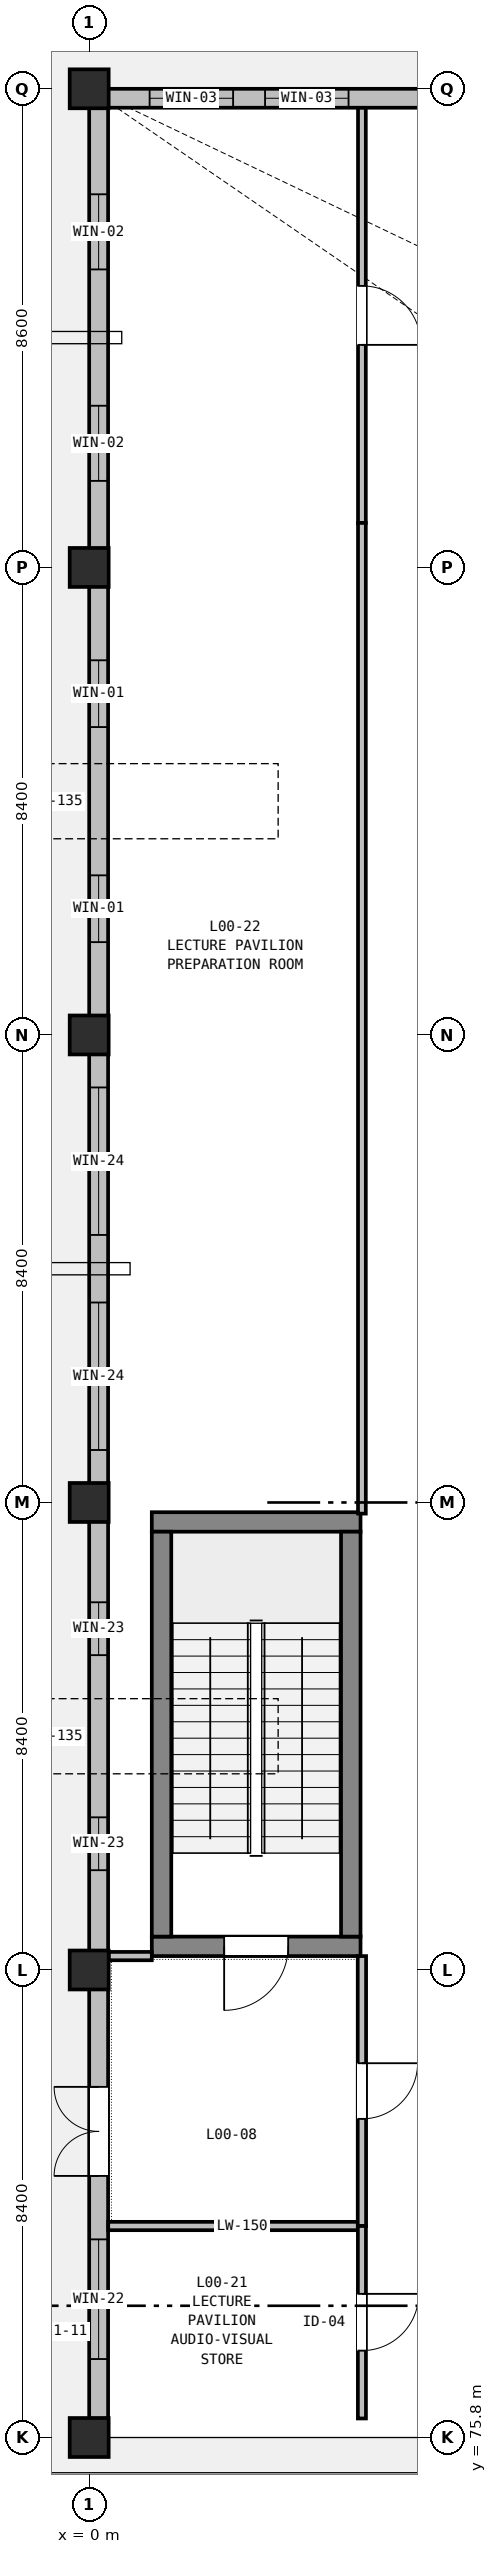
"""IFC4 building model, lengths in metres.
Left out: names, types, materials, properties, quantities, classifications, styles, units other than length and angle.
Written with IfcOpenShell. Run it as: python <this file> out.ifc"""

import sys

from ifc_helpers import new_model, si_unit, direction, frame, frame_2d, origin, origin_2d, place, context, subcontext, project, spatial, rectangle, extrude, element, fill, save


model = new_model("IFC4")
c1 = context("Model", 3, precision=1e-05, world=origin(), true_north=direction((0.0, 1.0)))
c2 = subcontext(c1, "Body", "Model", "MODEL_VIEW")
j1 = project(units=[si_unit("LENGTHUNIT", "METRE"), si_unit("PLANEANGLEUNIT", "RADIAN")], contexts=[c1])
p1 = place(None, origin())
s1 = spatial("IfcSite", under=j1, at=p1, CompositionType="ELEMENT")
p2 = place(p1, origin())
s2 = spatial("IfcBuilding", under=s1, at=p2, CompositionType="ELEMENT")
p3 = place(p2, origin())
s3 = spatial("IfcBuildingStorey", under=s2, at=p3, CompositionType="ELEMENT", Elevation=0.0)
for number, where, z_axis, x_axis in (
    (1, (0.0, 75.8, -0.32), (0.0, 0.0, 1.0), (1.0, 0.0, 0.0)),
    (2, (0.0, 84.2, -0.32), (0.0, 0.0, 1.0), (1.0, 0.0, 0.0)),
    (3, (0.0, 92.6, -0.32), (0.0, 0.0, 1.0), (1.0, 0.0, 0.0)),
    (4, (0.0, 101.0, -0.32), (0.0, 0.0, 1.0), (1.0, 0.0, 0.0)),
    (5, (0.0, 109.4, -0.32), (0.0, 0.0, 1.0), (1.0, 0.0, 0.0)),
    (6, (0.0, 118.0, -0.32), (0.0, 0.0, 1.0), (1.0, 0.0, 0.0)),
):
    element("IfcColumn", number, at=place(p3, frame(where, z_axis=z_axis, x_axis=x_axis)), inside=s3, PredefinedType="COLUMN", context=c2, shape_type="SweptSolid", body=[
        extrude(rectangle(XDim=0.7, YDim=0.7, at=origin_2d()), origin(), (0.0, 0.0, 1.0), 5.72),
    ])
p4 = place(p3, frame((4.875, 84.625, -0.32), z_axis=(0.0, 0.0, 1.0), x_axis=(-1.0, 0.0, 0.0)))
e7 = element("IfcWall", 7, at=p4, inside=s3, PredefinedType="SHEAR", context=c2, shape_type="SweptSolid", body=[
    extrude(rectangle(XDim=3.75, YDim=0.35, at=frame_2d((1.875, 0.0))), origin(), (0.0, 0.0, 1.0), 5.72),
])
p5 = place(p4, frame((1.3, 0.0, 0.32)))
e8 = element("IfcOpeningElement", 8, at=p5, cuts=e7, PredefinedType="OPENING", context=c2, shape_type="SweptSolid", body=[
    extrude(rectangle(XDim=1.15, YDim=2.15, at=frame_2d((0.575, 1.075))), frame((0.0, 0.185, 0.0), z_axis=(0.0, -1.0, 0.0), x_axis=(1.0, 0.0, 0.0)), (0.0, 0.0, 1.0), 0.37),
])
p6 = place(p3, frame((1.125, 92.25, -0.32), z_axis=(0.0, 0.0, 1.0), x_axis=(1.0, 0.0, 0.0)))
e9 = element("IfcWall", 9, at=p6, inside=s3, PredefinedType="SHEAR", context=c2, shape_type="SweptSolid", body=[
    extrude(rectangle(XDim=3.75, YDim=0.35, at=frame_2d((1.875, 0.0))), origin(), (0.0, 0.0, 1.0), 5.72),
])
for number, where, z_axis, x_axis in (
    (10, (1.3, 84.8, -0.32), (0.0, 0.0, 1.0), (0.0, 1.0, 0.0)),
    (11, (4.7, 84.8, -0.32), (0.0, 0.0, 1.0), (0.0, 1.0, 0.0)),
):
    element("IfcWall", number, at=place(p3, frame(where, z_axis=z_axis, x_axis=x_axis)), inside=s3, PredefinedType="SHEAR", context=c2, shape_type="SweptSolid", body=[
        extrude(rectangle(XDim=7.275, YDim=0.35, at=frame_2d((3.637, 0.0))), origin(), (0.0, 0.0, 1.0), 5.72),
    ])
p7 = place(p3, frame((6.8, 75.97, 0.0), z_axis=(0.0, 0.0, 1.0), x_axis=(-1.0, 0.0, 0.0)))
e12 = element("IfcWall", 12, at=p7, inside=s3, PredefinedType="STANDARD", context=c2, shape_type="SweptSolid", body=[
    extrude(rectangle(XDim=6.8, YDim=0.34, at=frame_2d((3.4, 0.0))), origin(), (0.0, 0.0, 1.0), 4.535),
])
p8 = place(p7, frame((2.14, 0.0, 0.75)))
e13 = element("IfcOpeningElement", 13, at=p8, cuts=e12, PredefinedType="OPENING", context=c2, shape_type="SweptSolid", body=[
    extrude(rectangle(XDim=1.8, YDim=2.4, at=frame_2d((0.9, 1.2))), frame((0.0, 0.18, 0.0), z_axis=(0.0, -1.0, 0.0), x_axis=(1.0, 0.0, 0.0)), (0.0, 0.0, 1.0), 0.36),
])
p9 = place(p3, frame((0.17, 76.14, 0.0), z_axis=(0.0, 0.0, 1.0), x_axis=(0.0, 1.0, 0.0)))
e14 = element("IfcWall", 14, at=p9, inside=s3, PredefinedType="STANDARD", context=c2, shape_type="SweptSolid", body=[
    extrude(rectangle(XDim=8.06, YDim=0.34, at=frame_2d((4.03, 0.0))), origin(), (0.0, 0.0, 1.0), 4.685),
])
p10 = place(p9, frame((4.36, 0.0, 0.0)))
e15 = element("IfcOpeningElement", 15, at=p10, cuts=e14, PredefinedType="OPENING", context=c2, shape_type="SweptSolid", body=[
    extrude(rectangle(XDim=1.6, YDim=2.2, at=frame_2d((0.8, 1.1))), frame((0.0, 0.18, 0.0), z_axis=(0.0, -1.0, 0.0), x_axis=(1.0, 0.0, 0.0)), (0.0, 0.0, 1.0), 0.36),
])
p11 = place(p9, frame((1.07, 0.0, 0.75)))
e16 = element("IfcOpeningElement", 16, at=p11, cuts=e14, PredefinedType="OPENING", context=c2, shape_type="SweptSolid", body=[
    extrude(rectangle(XDim=2.15, YDim=2.4, at=frame_2d((1.075, 1.2))), frame((0.0, 0.18, 0.0), z_axis=(0.0, -1.0, 0.0), x_axis=(1.0, 0.0, 0.0)), (0.0, 0.0, 1.0), 0.36),
])
p12 = place(p3, frame((0.17, 84.2, 0.0), z_axis=(0.0, 0.0, 1.0), x_axis=(0.0, 1.0, 0.0)))
e17 = element("IfcWall", 17, at=p12, inside=s3, PredefinedType="STANDARD", context=c2, shape_type="SweptSolid", body=[
    extrude(rectangle(XDim=8.4, YDim=0.34, at=frame_2d((4.2, 0.0))), origin(), (0.0, 0.0, 1.0), 4.685),
])
p13 = place(p12, frame((1.793, 0.0, 0.9)))
e18 = element("IfcOpeningElement", 18, at=p13, cuts=e17, PredefinedType="OPENING", context=c2, shape_type="SweptSolid", body=[
    extrude(rectangle(XDim=0.95, YDim=1.8, at=frame_2d((0.475, 0.9))), frame((0.0, 0.18, 0.0), z_axis=(0.0, -1.0, 0.0), x_axis=(1.0, 0.0, 0.0)), (0.0, 0.0, 1.0), 0.36),
])
p14 = place(p12, frame((5.657, 0.0, 0.9)))
e19 = element("IfcOpeningElement", 19, at=p14, cuts=e17, PredefinedType="OPENING", context=c2, shape_type="SweptSolid", body=[
    extrude(rectangle(XDim=0.95, YDim=1.8, at=frame_2d((0.475, 0.9))), frame((0.0, 0.18, 0.0), z_axis=(0.0, -1.0, 0.0), x_axis=(1.0, 0.0, 0.0)), (0.0, 0.0, 1.0), 0.36),
])
p15 = place(p3, frame((0.17, 92.6, 0.0), z_axis=(0.0, 0.0, 1.0), x_axis=(0.0, 1.0, 0.0)))
e20 = element("IfcWall", 20, at=p15, inside=s3, PredefinedType="STANDARD", context=c2, shape_type="SweptSolid", body=[
    extrude(rectangle(XDim=8.4, YDim=0.34, at=frame_2d((4.2, 0.0))), origin(), (0.0, 0.0, 1.0), 4.685),
])
p16 = place(p15, frame((0.943, 0.0, 0.9)))
e21 = element("IfcOpeningElement", 21, at=p16, cuts=e20, PredefinedType="OPENING", context=c2, shape_type="SweptSolid", body=[
    extrude(rectangle(XDim=2.65, YDim=1.85, at=frame_2d((1.325, 0.925))), frame((0.0, 0.18, 0.0), z_axis=(0.0, -1.0, 0.0), x_axis=(1.0, 0.0, 0.0)), (0.0, 0.0, 1.0), 0.36),
])
p17 = place(p15, frame((4.807, 0.0, 0.9)))
e22 = element("IfcOpeningElement", 22, at=p17, cuts=e20, PredefinedType="OPENING", context=c2, shape_type="SweptSolid", body=[
    extrude(rectangle(XDim=2.65, YDim=1.85, at=frame_2d((1.325, 0.925))), frame((0.0, 0.18, 0.0), z_axis=(0.0, -1.0, 0.0), x_axis=(1.0, 0.0, 0.0)), (0.0, 0.0, 1.0), 0.36),
])
p18 = place(p3, frame((0.17, 101.0, 0.0), z_axis=(0.0, 0.0, 1.0), x_axis=(0.0, 1.0, 0.0)))
e23 = element("IfcWall", 23, at=p18, inside=s3, PredefinedType="STANDARD", context=c2, shape_type="SweptSolid", body=[
    extrude(rectangle(XDim=8.4, YDim=0.34, at=frame_2d((4.2, 0.0))), origin(), (0.0, 0.0, 1.0), 4.685),
])
p19 = place(p18, frame((1.668, 0.0, 0.9)))
e24 = element("IfcOpeningElement", 24, at=p19, cuts=e23, PredefinedType="OPENING", context=c2, shape_type="SweptSolid", body=[
    extrude(rectangle(XDim=1.2, YDim=2.1, at=frame_2d((0.6, 1.05))), frame((0.0, 0.18, 0.0), z_axis=(0.0, -1.0, 0.0), x_axis=(1.0, 0.0, 0.0)), (0.0, 0.0, 1.0), 0.36),
])
p20 = place(p18, frame((5.532, 0.0, 0.9)))
e25 = element("IfcOpeningElement", 25, at=p20, cuts=e23, PredefinedType="OPENING", context=c2, shape_type="SweptSolid", body=[
    extrude(rectangle(XDim=1.2, YDim=2.1, at=frame_2d((0.6, 1.05))), frame((0.0, 0.18, 0.0), z_axis=(0.0, -1.0, 0.0), x_axis=(1.0, 0.0, 0.0)), (0.0, 0.0, 1.0), 0.36),
])
p21 = place(p3, frame((0.17, 109.4, 0.0), z_axis=(0.0, 0.0, 1.0), x_axis=(0.0, 1.0, 0.0)))
e26 = element("IfcWall", 26, at=p21, inside=s3, PredefinedType="STANDARD", context=c2, shape_type="SweptSolid", body=[
    extrude(rectangle(XDim=8.26, YDim=0.34, at=frame_2d((4.13, 0.0))), origin(), (0.0, 0.0, 1.0), 4.685),
])
p22 = place(p21, frame((1.555, 0.0, 0.9)))
e27 = element("IfcOpeningElement", 27, at=p22, cuts=e26, PredefinedType="OPENING", context=c2, shape_type="SweptSolid", body=[
    extrude(rectangle(XDim=1.35, YDim=2.1, at=frame_2d((0.675, 1.05))), frame((0.0, 0.18, 0.0), z_axis=(0.0, -1.0, 0.0), x_axis=(1.0, 0.0, 0.0)), (0.0, 0.0, 1.0), 0.36),
])
p23 = place(p21, frame((5.355, 0.0, 0.9)))
e28 = element("IfcOpeningElement", 28, at=p23, cuts=e26, PredefinedType="OPENING", context=c2, shape_type="SweptSolid", body=[
    extrude(rectangle(XDim=1.35, YDim=2.1, at=frame_2d((0.675, 1.05))), frame((0.0, 0.18, 0.0), z_axis=(0.0, -1.0, 0.0), x_axis=(1.0, 0.0, 0.0)), (0.0, 0.0, 1.0), 0.36),
])
p24 = place(p3, frame((0.0, 117.83, 0.0), z_axis=(0.0, 0.0, 1.0), x_axis=(1.0, 0.0, 0.0)))
e29 = element("IfcWall", 29, at=p24, inside=s3, PredefinedType="STANDARD", context=c2, shape_type="SweptSolid", body=[
    extrude(rectangle(XDim=6.8, YDim=0.34, at=frame_2d((3.4, 0.0))), origin(), (0.0, 0.0, 1.0), 4.535),
])
p25 = place(p24, frame((1.086, 0.0, 0.9)))
e30 = element("IfcOpeningElement", 30, at=p25, cuts=e29, PredefinedType="OPENING", context=c2, shape_type="SweptSolid", body=[
    extrude(rectangle(XDim=1.5, YDim=2.1, at=frame_2d((0.75, 1.05))), frame((0.0, 0.18, 0.0), z_axis=(0.0, -1.0, 0.0), x_axis=(1.0, 0.0, 0.0)), (0.0, 0.0, 1.0), 0.36),
])
p26 = place(p24, frame((3.16, 0.0, 0.9)))
e31 = element("IfcOpeningElement", 31, at=p26, cuts=e29, PredefinedType="OPENING", context=c2, shape_type="SweptSolid", body=[
    extrude(rectangle(XDim=1.5, YDim=2.1, at=frame_2d((0.75, 1.05))), frame((0.0, 0.18, 0.0), z_axis=(0.0, -1.0, 0.0), x_axis=(1.0, 0.0, 0.0)), (0.0, 0.0, 1.0), 0.36),
])
p27 = place(p3, frame((4.9, 79.6, 0.0), z_axis=(0.0, 0.0, 1.0), x_axis=(-1.0, 0.0, 0.0)))
e32 = element("IfcWall", 32, at=p27, inside=s3, PredefinedType="PARTITIONING", context=c2, shape_type="SweptSolid", body=[
    extrude(rectangle(XDim=4.558, YDim=0.15, at=frame_2d((2.279, 0.0))), origin(), (0.0, 0.0, 1.0), 4.885),
])
p28 = place(p3, frame((0.35, 84.45, 0.0), z_axis=(0.0, 0.0, 1.0), x_axis=(1.0, 0.0, 0.0)))
e33 = element("IfcWall", 33, at=p28, inside=s3, PredefinedType="PARTITIONING", context=c2, shape_type="SweptSolid", body=[
    extrude(rectangle(XDim=0.775, YDim=0.15, at=frame_2d((0.387, 0.0))), origin(), (0.0, 0.0, 1.0), 4.735),
])
p29 = place(p3, frame((4.9, 84.45, 0.0), z_axis=(0.0, 0.0, 1.0), x_axis=(0.0, -1.0, 0.0)))
e34 = element("IfcWall", 34, at=p29, inside=s3, PredefinedType="PARTITIONING", context=c2, shape_type="SweptSolid", body=[
    extrude(rectangle(XDim=4.85, YDim=0.15, at=frame_2d((2.425, 0.0))), origin(), (0.0, 0.0, 1.0), 4.735),
])
p30 = place(p29, frame((1.925, 0.0, 0.0)))
e35 = element("IfcOpeningElement", 35, at=p30, cuts=e34, PredefinedType="OPENING", context=c2, shape_type="SweptSolid", body=[
    extrude(rectangle(XDim=1.0, YDim=2.1, at=frame_2d((0.5, 1.05))), frame((0.0, 0.085, 0.0), z_axis=(0.0, -1.0, 0.0), x_axis=(1.0, 0.0, 0.0)), (0.0, 0.0, 1.0), 0.17),
])
p31 = place(p3, frame((4.9, 79.6, 0.0), z_axis=(0.0, 0.0, 1.0), x_axis=(0.0, -1.0, 0.0)))
e36 = element("IfcWall", 36, at=p31, inside=s3, PredefinedType="PARTITIONING", context=c2, shape_type="SweptSolid", body=[
    extrude(rectangle(XDim=3.458, YDim=0.145, at=frame_2d((1.729, 0.0))), origin(), (0.0, 0.0, 1.0), 5.095),
])
p32 = place(p31, frame((1.219, 0.0, 0.0)))
e37 = element("IfcOpeningElement", 37, at=p32, cuts=e36, PredefinedType="OPENING", context=c2, shape_type="SweptSolid", body=[
    extrude(rectangle(XDim=1.02, YDim=2.02, at=frame_2d((0.51, 1.01))), frame((0.0, 0.083, 0.0), z_axis=(0.0, -1.0, 0.0), x_axis=(1.0, 0.0, 0.0)), (0.0, 0.0, 1.0), 0.165),
])
p33 = place(p3, frame((4.9, 117.658, 0.0), z_axis=(0.0, 0.0, 1.0), x_axis=(0.0, -1.0, 0.0)))
e38 = element("IfcWall", 38, at=p33, inside=s3, PredefinedType="PARTITIONING", context=c2, shape_type="SweptSolid", body=[
    extrude(rectangle(XDim=7.458, YDim=0.14, at=frame_2d((3.729, 0.0))), origin(), (0.0, 0.0, 1.0), 5.095),
])
p34 = place(p33, frame((3.199, 0.0, 0.0)))
e39 = element("IfcOpeningElement", 39, at=p34, cuts=e38, PredefinedType="OPENING", context=c2, shape_type="SweptSolid", body=[
    extrude(rectangle(XDim=1.06, YDim=2.02, at=frame_2d((0.53, 1.01))), frame((0.0, 0.08, 0.0), z_axis=(0.0, -1.0, 0.0), x_axis=(1.0, 0.0, 0.0)), (0.0, 0.0, 1.0), 0.16),
])
p35 = place(p3, frame((4.9, 110.2, 0.0), z_axis=(0.0, 0.0, 1.0), x_axis=(0.0, -1.0, 0.0)))
e40 = element("IfcWall", 40, at=p35, inside=s3, PredefinedType="PARTITIONING", context=c2, shape_type="SweptSolid", body=[
    extrude(rectangle(XDim=17.8, YDim=0.14, at=frame_2d((8.9, 0.0))), origin(), (0.0, 0.0, 1.0), 4.735),
])
p36 = place(p10, origin())
e41 = element("IfcDoor", 41, at=p36, inside=s3, OperationType="DOUBLE_DOOR_SINGLE_SWING", PredefinedType="DOOR", context=c2, shape_type="SweptSolid", body=[
    extrude(rectangle(XDim=1.6, YDim=2.2, at=frame_2d((0.8, 1.1))), frame((0.0, 0.025, 0.0), z_axis=(0.0, -1.0, 0.0), x_axis=(1.0, 0.0, 0.0)), (0.0, 0.0, 1.0), 0.05),
])
fill(e15, e41)
p37 = place(p8, origin())
e42 = element("IfcWindow", 42, at=p37, inside=s3, PartitioningType="SINGLE_PANEL", PredefinedType="WINDOW", context=c2, shape_type="SweptSolid", body=[
    extrude(rectangle(XDim=1.8, YDim=2.4, at=frame_2d((0.9, 1.2))), frame((0.0, 0.03, 0.0), z_axis=(0.0, -1.0, 0.0), x_axis=(1.0, 0.0, 0.0)), (0.0, 0.0, 1.0), 0.06),
])
fill(e13, e42)
p38 = place(p11, origin())
e43 = element("IfcWindow", 43, at=p38, inside=s3, PartitioningType="SINGLE_PANEL", PredefinedType="WINDOW", context=c2, shape_type="SweptSolid", body=[
    extrude(rectangle(XDim=2.15, YDim=2.4, at=frame_2d((1.075, 1.2))), frame((0.0, 0.03, 0.0), z_axis=(0.0, -1.0, 0.0), x_axis=(1.0, 0.0, 0.0)), (0.0, 0.0, 1.0), 0.06),
])
fill(e16, e43)
p39 = place(p13, origin())
e44 = element("IfcWindow", 44, at=p39, inside=s3, PartitioningType="SINGLE_PANEL", PredefinedType="WINDOW", context=c2, shape_type="SweptSolid", body=[
    extrude(rectangle(XDim=0.95, YDim=1.8, at=frame_2d((0.475, 0.9))), frame((0.0, 0.03, 0.0), z_axis=(0.0, -1.0, 0.0), x_axis=(1.0, 0.0, 0.0)), (0.0, 0.0, 1.0), 0.06),
])
fill(e18, e44)
p40 = place(p14, origin())
e45 = element("IfcWindow", 45, at=p40, inside=s3, PartitioningType="SINGLE_PANEL", PredefinedType="WINDOW", context=c2, shape_type="SweptSolid", body=[
    extrude(rectangle(XDim=0.95, YDim=1.8, at=frame_2d((0.475, 0.9))), frame((0.0, 0.03, 0.0), z_axis=(0.0, -1.0, 0.0), x_axis=(1.0, 0.0, 0.0)), (0.0, 0.0, 1.0), 0.06),
])
fill(e19, e45)
p41 = place(p16, origin())
e46 = element("IfcWindow", 46, at=p41, inside=s3, PartitioningType="SINGLE_PANEL", PredefinedType="WINDOW", context=c2, shape_type="SweptSolid", body=[
    extrude(rectangle(XDim=2.65, YDim=1.85, at=frame_2d((1.325, 0.925))), frame((0.0, 0.03, 0.0), z_axis=(0.0, -1.0, 0.0), x_axis=(1.0, 0.0, 0.0)), (0.0, 0.0, 1.0), 0.06),
])
fill(e21, e46)
p42 = place(p17, origin())
e47 = element("IfcWindow", 47, at=p42, inside=s3, PartitioningType="SINGLE_PANEL", PredefinedType="WINDOW", context=c2, shape_type="SweptSolid", body=[
    extrude(rectangle(XDim=2.65, YDim=1.85, at=frame_2d((1.325, 0.925))), frame((0.0, 0.03, 0.0), z_axis=(0.0, -1.0, 0.0), x_axis=(1.0, 0.0, 0.0)), (0.0, 0.0, 1.0), 0.06),
])
fill(e22, e47)
p43 = place(p19, origin())
e48 = element("IfcWindow", 48, at=p43, inside=s3, PartitioningType="SINGLE_PANEL", PredefinedType="WINDOW", context=c2, shape_type="SweptSolid", body=[
    extrude(rectangle(XDim=1.2, YDim=2.1, at=frame_2d((0.6, 1.05))), frame((0.0, 0.03, 0.0), z_axis=(0.0, -1.0, 0.0), x_axis=(1.0, 0.0, 0.0)), (0.0, 0.0, 1.0), 0.06),
])
fill(e24, e48)
p44 = place(p20, origin())
e49 = element("IfcWindow", 49, at=p44, inside=s3, PartitioningType="SINGLE_PANEL", PredefinedType="WINDOW", context=c2, shape_type="SweptSolid", body=[
    extrude(rectangle(XDim=1.2, YDim=2.1, at=frame_2d((0.6, 1.05))), frame((0.0, 0.03, 0.0), z_axis=(0.0, -1.0, 0.0), x_axis=(1.0, 0.0, 0.0)), (0.0, 0.0, 1.0), 0.06),
])
fill(e25, e49)
p45 = place(p22, origin())
e50 = element("IfcWindow", 50, at=p45, inside=s3, PartitioningType="SINGLE_PANEL", PredefinedType="WINDOW", context=c2, shape_type="SweptSolid", body=[
    extrude(rectangle(XDim=1.35, YDim=2.1, at=frame_2d((0.675, 1.05))), frame((0.0, 0.03, 0.0), z_axis=(0.0, -1.0, 0.0), x_axis=(1.0, 0.0, 0.0)), (0.0, 0.0, 1.0), 0.06),
])
fill(e27, e50)
p46 = place(p23, origin())
e51 = element("IfcWindow", 51, at=p46, inside=s3, PartitioningType="SINGLE_PANEL", PredefinedType="WINDOW", context=c2, shape_type="SweptSolid", body=[
    extrude(rectangle(XDim=1.35, YDim=2.1, at=frame_2d((0.675, 1.05))), frame((0.0, 0.03, 0.0), z_axis=(0.0, -1.0, 0.0), x_axis=(1.0, 0.0, 0.0)), (0.0, 0.0, 1.0), 0.06),
])
fill(e28, e51)
p47 = place(p25, origin())
e52 = element("IfcWindow", 52, at=p47, inside=s3, PartitioningType="SINGLE_PANEL", PredefinedType="WINDOW", context=c2, shape_type="SweptSolid", body=[
    extrude(rectangle(XDim=1.5, YDim=2.1, at=frame_2d((0.75, 1.05))), frame((0.0, 0.03, 0.0), z_axis=(0.0, -1.0, 0.0), x_axis=(1.0, 0.0, 0.0)), (0.0, 0.0, 1.0), 0.06),
])
fill(e30, e52)
p48 = place(p26, origin())
e53 = element("IfcWindow", 53, at=p48, inside=s3, PartitioningType="SINGLE_PANEL", PredefinedType="WINDOW", context=c2, shape_type="SweptSolid", body=[
    extrude(rectangle(XDim=1.5, YDim=2.1, at=frame_2d((0.75, 1.05))), frame((0.0, 0.03, 0.0), z_axis=(0.0, -1.0, 0.0), x_axis=(1.0, 0.0, 0.0)), (0.0, 0.0, 1.0), 0.06),
])
fill(e31, e53)
p49 = place(p5, origin())
e54 = element("IfcDoor", 54, at=p49, inside=s3, OperationType="SINGLE_SWING_RIGHT", PredefinedType="DOOR", context=c2, shape_type="SweptSolid", body=[
    extrude(rectangle(XDim=1.15, YDim=2.15, at=frame_2d((0.575, 1.075))), frame((0.0, 0.025, 0.0), z_axis=(0.0, -1.0, 0.0), x_axis=(1.0, 0.0, 0.0)), (0.0, 0.0, 1.0), 0.05),
])
fill(e8, e54)
p50 = place(p30, origin())
e55 = element("IfcDoor", 55, at=p50, inside=s3, OperationType="SINGLE_SWING_LEFT", PredefinedType="DOOR", context=c2, shape_type="SweptSolid", body=[
    extrude(rectangle(XDim=1.0, YDim=2.1, at=frame_2d((0.5, 1.05))), frame((0.0, 0.025, 0.0), z_axis=(0.0, -1.0, 0.0), x_axis=(1.0, 0.0, 0.0)), (0.0, 0.0, 1.0), 0.05),
])
fill(e35, e55)
p51 = place(p32, origin())
e56 = element("IfcDoor", 56, at=p51, inside=s3, OperationType="SINGLE_SWING_LEFT", PredefinedType="DOOR", context=c2, shape_type="SweptSolid", body=[
    extrude(rectangle(XDim=1.02, YDim=2.02, at=frame_2d((0.51, 1.01))), frame((0.0, 0.025, 0.0), z_axis=(0.0, -1.0, 0.0), x_axis=(1.0, 0.0, 0.0)), (0.0, 0.0, 1.0), 0.05),
])
fill(e37, e56)
p52 = place(p34, origin())
e57 = element("IfcDoor", 57, at=p52, inside=s3, OperationType="SINGLE_SWING_RIGHT", PredefinedType="DOOR", context=c2, shape_type="SweptSolid", body=[
    extrude(rectangle(XDim=1.06, YDim=2.02, at=frame_2d((0.53, 1.01))), frame((0.0, 0.025, 0.0), z_axis=(0.0, -1.0, 0.0), x_axis=(1.0, 0.0, 0.0)), (0.0, 0.0, 1.0), 0.05),
])
fill(e39, e57)
save(model, sys.argv[1])
